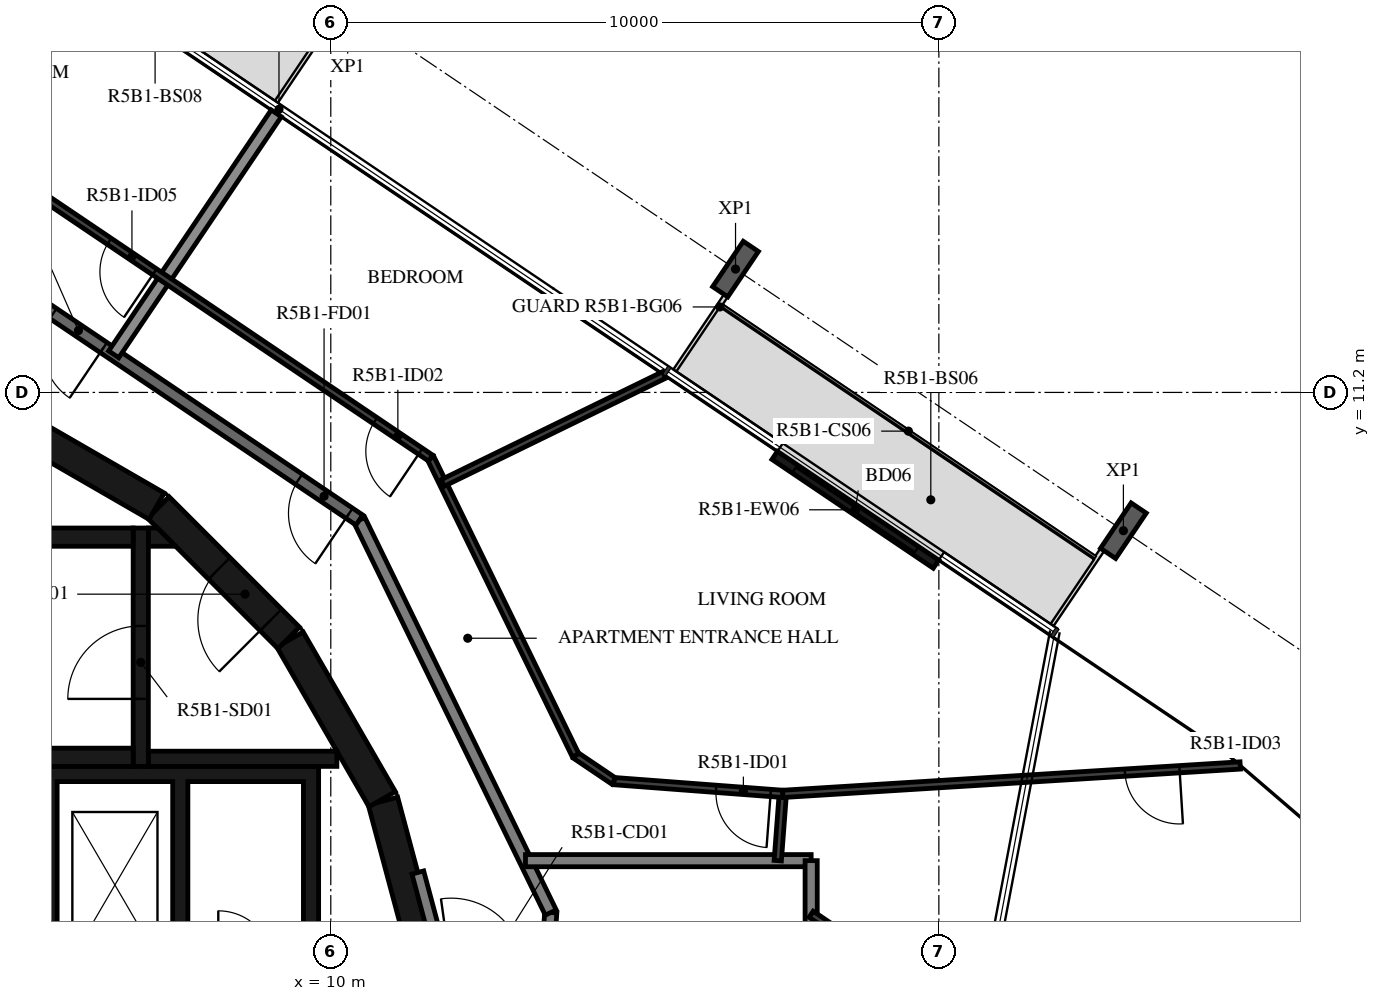
"""IFC4 building model, lengths in metres.
Left out: names, types, materials, properties, quantities, classifications, styles, units other than length and angle.
Written with IfcOpenShell. Run it as: python <this file> out.ifc"""

import sys

from ifc_helpers import new_model, si_unit, direction, frame, frame_2d, origin, origin_2d, place, context, subcontext, project, spatial, polyline, rectangle, i_section, outline, extrude, element, fill, save


model = new_model("IFC4")
c1 = context("Model", 3, precision=1e-05, world=origin(), true_north=direction((0.0, 1.0)))
c2 = subcontext(c1, "Body", "Model", "MODEL_VIEW")
j1 = project(units=[si_unit("LENGTHUNIT", "METRE"), si_unit("PLANEANGLEUNIT", "RADIAN")], contexts=[c1])
p1 = place(None, origin())
s1 = spatial("IfcSite", under=j1, at=p1, CompositionType="ELEMENT")
p2 = place(p1, origin())
s2 = spatial("IfcBuilding", under=s1, at=p2, CompositionType="ELEMENT")
p3 = place(p2, frame((0.0, 0.0, 198.9)))
s3 = spatial("IfcBuildingStorey", under=s2, at=p3, CompositionType="ELEMENT", Elevation=198.9)
for number, where, z_axis, x_axis in (
    (1, (23.035, 8.926, -0.38), (0.0, 0.0, 1.0), (0.829, -0.559, 0.0)),
    (2, (16.656, 13.228, -0.38), (0.0, 0.0, 1.0), (0.829, -0.559, 0.0)),
):
    element("IfcColumn", number, at=place(p3, frame(where, z_axis=z_axis, x_axis=x_axis)), inside=s3, PredefinedType="COLUMN", context=c2, shape_type="SweptSolid", body=[
        extrude(i_section(OverallWidth=0.3, OverallDepth=0.9, WebThickness=0.019, FlangeThickness=0.035, FilletRadius=0.03, at=origin_2d()), origin(), (0.0, 0.0, 1.0), 3.5),
    ])
p4 = place(p3, frame((19.953, 8.375, 0.0), z_axis=(0.0, 0.0, 1.0), x_axis=(-0.829068838882, 0.55914654644, 0.0)))
e3 = element("IfcWall", 3, at=p4, inside=s3, PredefinedType="STANDARD", context=c2, shape_type="SweptSolid", body=[
    extrude(rectangle(XDim=3.2, YDim=0.16, at=frame_2d((1.6, 0.0))), origin(), (0.0, 0.0, 1.0), 3.12),
])
p5 = place(p4, frame((0.4, 0.0, 0.0)))
e4 = element("IfcOpeningElement", 4, at=p5, cuts=e3, PredefinedType="OPENING", context=c2, shape_type="SweptSolid", body=[
    extrude(rectangle(XDim=2.4, YDim=2.4, at=frame_2d((1.2, 1.2))), frame((0.0, 0.09, 0.0), z_axis=(0.0, -1.0, 0.0), x_axis=(1.0, 0.0, 0.0)), (0.0, 0.0, 1.0), 0.18),
])
for number, where, z_axis, x_axis in (
    (5, (11.643, 1.55, 0.0), (0.0, 0.0, 1.0), (-0.259, 0.966, 0.0)),
    (6, (10.845, 4.51, 0.0), (0.0, 0.0, 1.0), (-0.5, 0.866, 0.0)),
):
    element("IfcWall", number, at=place(p3, frame(where, z_axis=z_axis, x_axis=x_axis)), inside=s3, PredefinedType="SHEAR", context=c2, shape_type="SweptSolid", body=[
        extrude(rectangle(XDim=3.033, YDim=0.5, at=frame_2d((1.516, 0.0))), origin(), (0.0, 0.0, 1.0), 3.12),
    ])
p6 = place(p3, frame((9.308, 7.164, 0.0), z_axis=(0.0, 0.0, 1.0), x_axis=(-0.707106781187, 0.707106781187, 0.0)))
e7 = element("IfcWall", 7, at=p6, inside=s3, PredefinedType="SHEAR", context=c2, shape_type="SweptSolid", body=[
    extrude(rectangle(XDim=3.032, YDim=0.5, at=frame_2d((1.516, 0.0))), origin(), (0.0, 0.0, 1.0), 3.12),
])
p7 = place(p6, frame((0.416, 0.0, 0.0)))
e8 = element("IfcOpeningElement", 8, at=p7, cuts=e7, PredefinedType="OPENING", context=c2, shape_type="SweptSolid", body=[
    extrude(rectangle(XDim=1.2, YDim=2.1, at=frame_2d((0.6, 1.05))), frame((0.0, 0.26, 0.0), z_axis=(0.0, -1.0, 0.0), x_axis=(1.0, 0.0, 0.0)), (0.0, 0.0, 1.0), 0.52),
])
p8 = place(p3, frame((7.137, 9.329, 0.0), z_axis=(0.0, 0.0, 1.0), x_axis=(-0.865975092491, 0.500087131594, 0.0)))
e9 = element("IfcWall", 9, at=p8, inside=s3, PredefinedType="SHEAR", context=c2, shape_type="SweptSolid", body=[
    extrude(rectangle(XDim=3.033, YDim=0.5, at=frame_2d((1.516, 0.0))), origin(), (0.0, 0.0, 1.0), 3.12),
])
for number, where, z_axis, x_axis in (
    (10, (0.0, 5.2, 0.0), (0.0, 0.0, 1.0), (1.0, 0.0, 0.0)),
    (11, (0.0, 8.82, 0.0), (0.0, 0.0, 1.0), (1.0, 0.0, 0.0)),
):
    element("IfcWall", number, at=place(p3, frame(where, z_axis=z_axis, x_axis=x_axis)), inside=s3, PredefinedType="SHEAR", context=c2, shape_type="SweptSolid", body=[
        extrude(rectangle(XDim=6.75, YDim=0.3, at=frame_2d((3.375, 0.0))), origin(), (0.0, 0.0, 1.0), 3.12),
    ])
p9 = place(p3, frame((6.875, 5.05, 0.0), z_axis=(0.0, 0.0, 1.0), x_axis=(0.0, 1.0, 0.0)))
e12 = element("IfcWall", 12, at=p9, inside=s3, PredefinedType="SHEAR", context=c2, shape_type="SweptSolid", body=[
    extrude(rectangle(XDim=3.92, YDim=0.25, at=frame_2d((1.96, 0.0))), origin(), (0.0, 0.0, 1.0), 3.12),
])
p10 = place(p9, frame((1.11, 0.0, 0.0)))
e13 = element("IfcOpeningElement", 13, at=p10, cuts=e12, PredefinedType="OPENING", context=c2, shape_type="SweptSolid", body=[
    extrude(rectangle(XDim=1.2, YDim=2.1, at=frame_2d((0.6, 1.05))), frame((0.0, 0.135, 0.0), z_axis=(0.0, -1.0, 0.0), x_axis=(1.0, 0.0, 0.0)), (0.0, 0.0, 1.0), 0.27),
])
p11 = place(p3, frame((7.0, 5.175, 0.0), z_axis=(0.0, 0.0, 1.0), x_axis=(1.0, 0.0, 0.0)))
e14 = element("IfcWall", 14, at=p11, inside=s3, PredefinedType="SHEAR", context=c2, shape_type="SweptSolid", body=[
    extrude(rectangle(XDim=3.1, YDim=0.25, at=frame_2d((1.55, 0.0))), origin(), (0.0, 0.0, 1.0), 3.12),
])
p12 = place(p3, origin())
e15 = element("IfcWall", 15, at=p12, inside=s3, PredefinedType="SHEAR", context=c2, shape_type="SweptSolid", body=[
    extrude(outline(polyline([(7.448, 8.67), (7.0, 8.67), (7.0, 8.97), (7.148, 8.97), (7.448, 8.67)])), origin(), (0.0, 0.0, 1.0), 3.12),
])
p13 = place(p3, origin())
e16 = element("IfcWall", 16, at=p13, inside=s3, PredefinedType="SHEAR", context=c2, shape_type="SweptSolid", body=[
    extrude(outline(polyline([(-9.55, 4.8), (-1.2, 4.8), (-1.2, 1.9), (-0.95, 1.9), (-0.95, 4.8), (0.95, 4.8), (0.95, 1.9), (1.2, 1.9), (1.2, 4.8), (3.1, 4.8), (3.1, 1.9), (3.35, 1.9), (3.35, 4.8), (5.25, 4.8), (5.25, 1.9), (5.5, 1.9), (5.5, 4.8), (7.4, 4.8), (7.4, 1.9), (7.65, 1.9), (7.65, 4.8), (9.55, 4.8), (9.55, 1.9), (9.8, 1.9), (9.8, 4.8), (9.8, 5.05), (-9.8, 5.05), (-9.8, 4.8), (-9.8, 1.9), (-9.55, 1.9), (-9.55, 4.8)])), origin(), (0.0, 0.0, 1.0), 3.12),
])
p14 = place(p3, frame((11.87, 1.668, 0.0), z_axis=(0.0, 0.0, 1.0), x_axis=(-0.258836880648, 0.965921047093, 0.0)))
e17 = element("IfcWall", 17, at=p14, inside=s3, PredefinedType="STANDARD", context=c2, shape_type="SweptSolid", body=[
    extrude(rectangle(XDim=1.695, YDim=0.2, at=frame_2d((0.848, 0.0))), origin(), (0.0, 0.0, 1.0), 3.12),
])
p15 = place(p3, frame((13.566, 1.906, 0.0), z_axis=(0.0, 0.0, 1.0), x_axis=(0.07005495793, 0.997543133338, 0.0)))
e18 = element("IfcWall", 18, at=p15, inside=s3, PredefinedType="STANDARD", context=c2, shape_type="SweptSolid", body=[
    extrude(rectangle(XDim=0.742, YDim=0.2, at=frame_2d((0.371, 0.0))), origin(), (0.0, 0.0, 1.0), 3.12),
])
p16 = place(p3, frame((13.618, 2.647, 0.0), z_axis=(0.0, 0.0, 1.0), x_axis=(-0.438366026218, 0.898796543751, 0.0)))
e19 = element("IfcWall", 19, at=p16, inside=s3, PredefinedType="STANDARD", context=c2, shape_type="SweptSolid", body=[
    extrude(rectangle(XDim=7.181, YDim=0.2, at=frame_2d((3.591, 0.0))), origin(), (0.0, 0.0, 1.0), 3.12),
])
p17 = place(p3, frame((10.47, 9.101, 0.0), z_axis=(0.0, 0.0, 1.0), x_axis=(-0.829035841718, 0.559195469534, 0.0)))
e20 = element("IfcWall", 20, at=p17, inside=s3, PredefinedType="STANDARD", context=c2, shape_type="SweptSolid", body=[
    extrude(rectangle(XDim=7.181, YDim=0.2, at=frame_2d((3.591, 0.0))), origin(), (0.0, 0.0, 1.0), 3.12),
])
p18 = place(p17, frame((0.2, 0.0, 0.0)))
e21 = element("IfcOpeningElement", 21, at=p18, cuts=e20, PredefinedType="OPENING", context=c2, shape_type="SweptSolid", body=[
    extrude(rectangle(XDim=1.0, YDim=2.1, at=frame_2d((0.5, 1.05))), frame((0.0, 0.11, 0.0), z_axis=(0.0, -1.0, 0.0), x_axis=(1.0, 0.0, 0.0)), (0.0, 0.0, 1.0), 0.22),
])
p19 = place(p17, frame((5.073, 0.0, 0.0)))
e22 = element("IfcOpeningElement", 22, at=p19, cuts=e20, PredefinedType="OPENING", context=c2, shape_type="SweptSolid", body=[
    extrude(rectangle(XDim=1.0, YDim=2.1, at=frame_2d((0.5, 1.05))), frame((0.0, 0.11, 0.0), z_axis=(0.0, -1.0, 0.0), x_axis=(1.0, 0.0, 0.0)), (0.0, 0.0, 1.0), 0.22),
])
p20 = place(p3, frame((17.9, 3.5, 0.0), z_axis=(0.0, 0.0, 1.0), x_axis=(-1.0, 0.0, 0.0)))
e23 = element("IfcWall", 23, at=p20, inside=s3, PredefinedType="STANDARD", context=c2, shape_type="SweptSolid", body=[
    extrude(rectangle(XDim=4.698, YDim=0.2, at=frame_2d((2.349, 0.0))), origin(), (0.0, 0.0, 1.0), 3.12),
])
p21 = place(p3, frame((17.9, -3.5, 0.0), z_axis=(0.0, 0.0, 1.0), x_axis=(0.0, 1.0, 0.0)))
e24 = element("IfcWall", 24, at=p21, inside=s3, PredefinedType="STANDARD", context=c2, shape_type="SweptSolid", body=[
    extrude(rectangle(XDim=7.0, YDim=0.2, at=frame_2d((3.5, 0.0))), origin(), (0.0, 0.0, 1.0), 3.12),
])
p22 = place(p3, frame((9.104, 15.79, 0.0), z_axis=(0.0, 0.0, 1.0), x_axis=(-0.559193912135, -0.829036892201, 0.0)))
e25 = element("IfcWall", 25, at=p22, inside=s3, PredefinedType="STANDARD", context=c2, shape_type="SweptSolid", body=[
    extrude(rectangle(XDim=4.781, YDim=0.2, at=frame_2d((2.39, 0.0))), origin(), (0.0, 0.0, 1.0), 2.73),
])
p23 = place(p3, frame((17.351, 3.5, 0.0), z_axis=(0.0, 0.0, 1.0), x_axis=(0.075374124137, 0.997155324616, 0.0)))
e26 = element("IfcWall", 26, at=p23, inside=s3, PredefinedType="PARTITIONING", context=c2, shape_type="SweptSolid", body=[
    extrude(rectangle(XDim=1.101, YDim=0.12, at=frame_2d((0.551, 0.0))), origin(), (0.0, 0.0, 1.0), 3.12),
])
p24 = place(p3, frame((17.434, 4.598, 0.0), z_axis=(0.0, 0.0, 1.0), x_axis=(-0.997152077354, 0.075417071205, 0.0)))
e27 = element("IfcWall", 27, at=p24, inside=s3, PredefinedType="PARTITIONING", context=c2, shape_type="SweptSolid", body=[
    extrude(rectangle(XDim=2.787, YDim=0.12, at=frame_2d((1.394, 0.0))), origin(), (0.0, 0.0, 1.0), 3.12),
])
p25 = place(p24, frame((0.2, 0.0, 0.0)))
e28 = element("IfcOpeningElement", 28, at=p25, cuts=e27, PredefinedType="OPENING", context=c2, shape_type="SweptSolid", body=[
    extrude(rectangle(XDim=0.9, YDim=2.1, at=frame_2d((0.45, 1.05))), frame((0.0, 0.07, 0.0), z_axis=(0.0, -1.0, 0.0), x_axis=(1.0, 0.0, 0.0)), (0.0, 0.0, 1.0), 0.14),
])
p26 = place(p3, frame((14.654, 4.808, 0.0), z_axis=(0.0, 0.0, 1.0), x_axis=(-0.829065184024, 0.559151965604, 0.0)))
e29 = element("IfcWall", 29, at=p26, inside=s3, PredefinedType="PARTITIONING", context=c2, shape_type="SweptSolid", body=[
    extrude(rectangle(XDim=0.758, YDim=0.12, at=frame_2d((0.379, 0.0))), origin(), (0.0, 0.0, 1.0), 3.12),
])
p27 = place(p3, frame((14.026, 5.232, 0.0), z_axis=(0.0, 0.0, 1.0), x_axis=(-0.438374985284, 0.89879217413, 0.0)))
e30 = element("IfcWall", 30, at=p27, inside=s3, PredefinedType="PARTITIONING", context=c2, shape_type="SweptSolid", body=[
    extrude(rectangle(XDim=5.438, YDim=0.12, at=frame_2d((2.719, 0.0))), origin(), (0.0, 0.0, 1.0), 3.12),
])
p28 = place(p3, frame((11.642, 10.12, 0.0), z_axis=(0.0, 0.0, 1.0), x_axis=(-0.829032241779, 0.55920080659, 0.0)))
e31 = element("IfcWall", 31, at=p28, inside=s3, PredefinedType="PARTITIONING", context=c2, shape_type="SweptSolid", body=[
    extrude(rectangle(XDim=7.985, YDim=0.12, at=frame_2d((3.992, 0.0))), origin(), (0.0, 0.0, 1.0), 3.12),
])
p29 = place(p28, frame((0.2, 0.0, 0.0)))
e32 = element("IfcOpeningElement", 32, at=p29, cuts=e31, PredefinedType="OPENING", context=c2, shape_type="SweptSolid", body=[
    extrude(rectangle(XDim=0.9, YDim=2.1, at=frame_2d((0.45, 1.05))), frame((0.0, 0.07, 0.0), z_axis=(0.0, -1.0, 0.0), x_axis=(1.0, 0.0, 0.0)), (0.0, 0.0, 1.0), 0.14),
])
p30 = place(p28, frame((5.475, 0.0, 0.0)))
e33 = element("IfcOpeningElement", 33, at=p30, cuts=e31, PredefinedType="OPENING", context=c2, shape_type="SweptSolid", body=[
    extrude(rectangle(XDim=0.9, YDim=2.1, at=frame_2d((0.45, 1.05))), frame((0.0, 0.07, 0.0), z_axis=(0.0, -1.0, 0.0), x_axis=(1.0, 0.0, 0.0)), (0.0, 0.0, 1.0), 0.14),
])
p31 = place(p3, frame((21.141, 0.433, 0.0), z_axis=(0.0, 0.0, 1.0), x_axis=(-0.829049908454, 0.559174614313, 0.0)))
e34 = element("IfcWall", 34, at=p31, inside=s3, PredefinedType="PARTITIONING", context=c2, shape_type="SweptSolid", body=[
    extrude(rectangle(XDim=3.909, YDim=0.12, at=frame_2d((1.955, 0.0))), origin(), (0.0, 0.0, 1.0), 3.12),
])
p32 = place(p31, frame((0.8, 0.0, 0.0)))
e35 = element("IfcOpeningElement", 35, at=p32, cuts=e34, PredefinedType="OPENING", context=c2, shape_type="SweptSolid", body=[
    extrude(rectangle(XDim=0.8, YDim=2.1, at=frame_2d((0.4, 1.05))), frame((0.0, 0.07, 0.0), z_axis=(0.0, -1.0, 0.0), x_axis=(1.0, 0.0, 0.0)), (0.0, 0.0, 1.0), 0.14),
])
p33 = place(p3, frame((24.956, 5.065, 0.0), z_axis=(0.0, 0.0, 1.0), x_axis=(-0.998076202118, -0.061999151332, 0.0)))
e36 = element("IfcWall", 36, at=p33, inside=s3, PredefinedType="PARTITIONING", context=c2, shape_type="SweptSolid", body=[
    extrude(rectangle(XDim=7.537, YDim=0.12, at=frame_2d((3.769, 0.0))), origin(), (0.0, 0.0, 1.0), 3.12),
])
p34 = place(p33, frame((1.0, 0.0, 0.0)))
e37 = element("IfcOpeningElement", 37, at=p34, cuts=e36, PredefinedType="OPENING", context=c2, shape_type="SweptSolid", body=[
    extrude(rectangle(XDim=0.9, YDim=2.1, at=frame_2d((0.45, 1.05))), frame((0.0, 0.07, 0.0), z_axis=(0.0, -1.0, 0.0), x_axis=(1.0, 0.0, 0.0)), (0.0, 0.0, 1.0), 0.14),
])
p35 = place(p3, frame((21.95, -0.382, 0.0), z_axis=(0.0, 0.0, 1.0), x_axis=(0.844596663126, 0.535403097336, 0.0)))
e38 = element("IfcWall", 38, at=p35, inside=s3, PredefinedType="PARTITIONING", context=c2, shape_type="SweptSolid", body=[
    extrude(rectangle(XDim=6.022, YDim=0.12, at=frame_2d((3.011, 0.0))), origin(), (0.0, 0.0, 1.0), 2.73),
])
p36 = place(p35, frame((0.6, 0.0, 0.0)))
e39 = element("IfcOpeningElement", 39, at=p36, cuts=e38, PredefinedType="OPENING", context=c2, shape_type="SweptSolid", body=[
    extrude(rectangle(XDim=0.9, YDim=2.1, at=frame_2d((0.45, 1.05))), frame((0.0, 0.07, 0.0), z_axis=(0.0, -1.0, 0.0), x_axis=(1.0, 0.0, 0.0)), (0.0, 0.0, 1.0), 0.14),
])
p37 = place(p3, frame((15.482, 11.487, 0.0), z_axis=(0.0, 0.0, 1.0), x_axis=(-0.898807251285, -0.438344071521, 0.0)))
e40 = element("IfcWall", 40, at=p37, inside=s3, PredefinedType="PARTITIONING", context=c2, shape_type="SweptSolid", body=[
    extrude(rectangle(XDim=4.051, YDim=0.12, at=frame_2d((2.025, 0.0))), origin(), (0.0, 0.0, 1.0), 3.12),
])
p38 = place(p5, origin())
e41 = element("IfcDoor", 41, at=p38, inside=s3, OperationType="DOUBLE_DOOR_SLIDING", PredefinedType="DOOR", context=c2, shape_type="SweptSolid", body=[
    extrude(rectangle(XDim=2.4, YDim=2.4, at=frame_2d((1.2, 1.2))), frame((0.0, 0.025, 0.0), z_axis=(0.0, -1.0, 0.0), x_axis=(1.0, 0.0, 0.0)), (0.0, 0.0, 1.0), 0.05),
])
fill(e4, e41)
p39 = place(p10, origin())
e42 = element("IfcDoor", 42, at=p39, inside=s3, OperationType="SINGLE_SWING_LEFT", PredefinedType="DOOR", context=c2, shape_type="SweptSolid", body=[
    extrude(rectangle(XDim=1.2, YDim=2.1, at=frame_2d((0.6, 1.05))), frame((0.0, 0.025, 0.0), z_axis=(0.0, -1.0, 0.0), x_axis=(1.0, 0.0, 0.0)), (0.0, 0.0, 1.0), 0.05),
])
fill(e13, e42)
p40 = place(p7, origin())
e43 = element("IfcDoor", 43, at=p40, inside=s3, OperationType="SINGLE_SWING_RIGHT", PredefinedType="DOOR", context=c2, shape_type="SweptSolid", body=[
    extrude(rectangle(XDim=1.2, YDim=2.1, at=frame_2d((0.6, 1.05))), frame((0.0, 0.025, 0.0), z_axis=(0.0, -1.0, 0.0), x_axis=(1.0, 0.0, 0.0)), (0.0, 0.0, 1.0), 0.05),
])
fill(e8, e43)
p41 = place(p18, origin())
e44 = element("IfcDoor", 44, at=p41, inside=s3, OperationType="SINGLE_SWING_LEFT", PredefinedType="DOOR", context=c2, shape_type="SweptSolid", body=[
    extrude(rectangle(XDim=1.0, YDim=2.1, at=frame_2d((0.5, 1.05))), frame((0.0, 0.025, 0.0), z_axis=(0.0, -1.0, 0.0), x_axis=(1.0, 0.0, 0.0)), (0.0, 0.0, 1.0), 0.05),
])
fill(e21, e44)
p42 = place(p25, origin())
e45 = element("IfcDoor", 45, at=p42, inside=s3, OperationType="SINGLE_SWING_LEFT", PredefinedType="DOOR", context=c2, shape_type="SweptSolid", body=[
    extrude(rectangle(XDim=0.9, YDim=2.1, at=frame_2d((0.45, 1.05))), frame((0.0, 0.025, 0.0), z_axis=(0.0, -1.0, 0.0), x_axis=(1.0, 0.0, 0.0)), (0.0, 0.0, 1.0), 0.05),
])
fill(e28, e45)
p43 = place(p29, origin())
e46 = element("IfcDoor", 46, at=p43, inside=s3, OperationType="SINGLE_SWING_LEFT", PredefinedType="DOOR", context=c2, shape_type="SweptSolid", body=[
    extrude(rectangle(XDim=0.9, YDim=2.1, at=frame_2d((0.45, 1.05))), frame((0.0, 0.025, 0.0), z_axis=(0.0, -1.0, 0.0), x_axis=(1.0, 0.0, 0.0)), (0.0, 0.0, 1.0), 0.05),
])
fill(e32, e46)
p44 = place(p34, origin())
e47 = element("IfcDoor", 47, at=p44, inside=s3, OperationType="SINGLE_SWING_LEFT", PredefinedType="DOOR", context=c2, shape_type="SweptSolid", body=[
    extrude(rectangle(XDim=0.9, YDim=2.1, at=frame_2d((0.45, 1.05))), frame((0.0, 0.025, 0.0), z_axis=(0.0, -1.0, 0.0), x_axis=(1.0, 0.0, 0.0)), (0.0, 0.0, 1.0), 0.05),
])
fill(e37, e47)
p45 = place(p19, origin())
e48 = element("IfcDoor", 48, at=p45, inside=s3, OperationType="SINGLE_SWING_RIGHT", PredefinedType="DOOR", context=c2, shape_type="SweptSolid", body=[
    extrude(rectangle(XDim=1.0, YDim=2.1, at=frame_2d((0.5, 1.05))), frame((0.0, 0.025, 0.0), z_axis=(0.0, -1.0, 0.0), x_axis=(1.0, 0.0, 0.0)), (0.0, 0.0, 1.0), 0.05),
])
fill(e22, e48)
p46 = place(p30, origin())
e49 = element("IfcDoor", 49, at=p46, inside=s3, OperationType="SINGLE_SWING_RIGHT", PredefinedType="DOOR", context=c2, shape_type="SweptSolid", body=[
    extrude(rectangle(XDim=0.9, YDim=2.1, at=frame_2d((0.45, 1.05))), frame((0.0, 0.025, 0.0), z_axis=(0.0, -1.0, 0.0), x_axis=(1.0, 0.0, 0.0)), (0.0, 0.0, 1.0), 0.05),
])
fill(e33, e49)
save(model, sys.argv[1])
